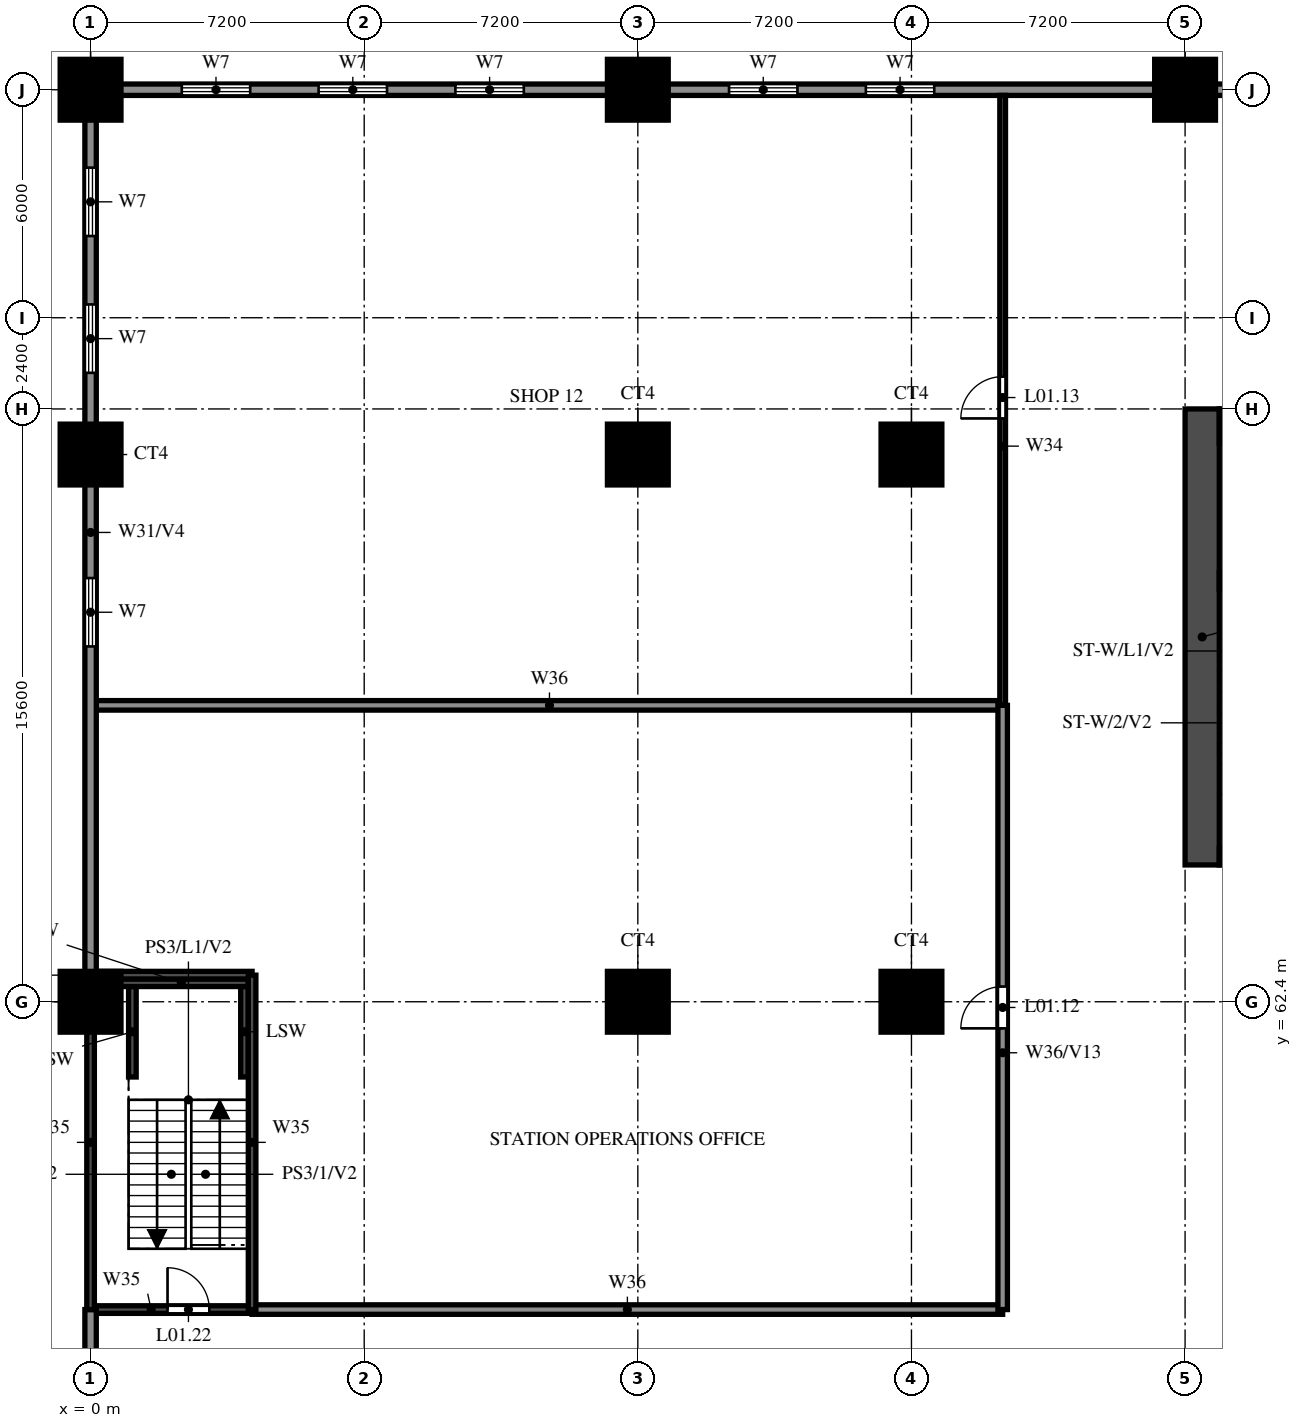
"""IFC4 building model, lengths in metres.
Left out: names, types, materials, properties, quantities, classifications, styles, units other than length and angle.
Written with IfcOpenShell. Run it as: python <this file> out.ifc"""

import sys

from ifc_helpers import new_model, si_unit, direction, frame, frame_2d, origin, origin_2d, place, context, subcontext, project, spatial, rectangle, circle, extrude, source, transform, mapped, element, fill, save


model = new_model("IFC4")
c1 = context("Model", 3, precision=1e-05, world=origin(), true_north=direction((0.0, 1.0)))
c2 = subcontext(c1, "Body", "Model", "MODEL_VIEW")
j1 = project(units=[si_unit("LENGTHUNIT", "METRE"), si_unit("PLANEANGLEUNIT", "RADIAN")], contexts=[c1])
p1 = place(None, origin())
s1 = spatial("IfcSite", under=j1, at=p1, CompositionType="ELEMENT")
p2 = place(p1, origin())
s2 = spatial("IfcBuilding", under=s1, at=p2, CompositionType="ELEMENT")
p3 = place(p2, frame((0.0, 0.0, 7.8)))
s3 = spatial("IfcBuildingStorey", under=s2, at=p3, CompositionType="ELEMENT", Elevation=7.8)
m1 = source(origin(), c2, "Body", "SweptSolid", [
    extrude(circle(Radius=0.8, at=origin_2d()), origin(), (0.0, 0.0, 1.0), 5.0),
])
for number, where, z_axis, x_axis in (
    (1, (0.0, 62.4, 0.0), (0.0, 0.0, 1.0), (1.0, 0.0, 0.0)),
    (2, (14.4, 62.4, 0.0), (0.0, 0.0, 1.0), (1.0, 0.0, 0.0)),
    (3, (21.6, 62.4, 0.0), (0.0, 0.0, 1.0), (1.0, 0.0, 0.0)),
    (4, (0.0, 76.8, 0.0), (0.0, 0.0, 1.0), (1.0, 0.0, 0.0)),
    (5, (14.4, 76.8, 0.0), (0.0, 0.0, 1.0), (1.0, 0.0, 0.0)),
    (6, (21.6, 76.8, 0.0), (0.0, 0.0, 1.0), (1.0, 0.0, 0.0)),
    (7, (0.0, 86.4, 0.0), (0.0, 0.0, 1.0), (1.0, 0.0, 0.0)),
    (8, (14.4, 86.4, 0.0), (0.0, 0.0, 1.0), (1.0, 0.0, 0.0)),
    (9, (28.8, 86.4, 0.0), (0.0, 0.0, 1.0), (1.0, 0.0, 0.0)),
):
    element("IfcColumn", number, at=place(p3, frame(where, z_axis=z_axis, x_axis=x_axis)), inside=s3, PredefinedType="COLUMN", context=c2, shape_type="MappedRepresentation", body=[
        mapped(m1, transform((0.0, 0.0, 0.0))),
    ])
p4 = place(p3, frame((29.25, 66.0, 0.0), z_axis=(0.0, 0.0, 1.0), x_axis=(0.0, 1.0, 0.0)))
e10 = element("IfcWall", 10, at=p4, inside=s3, PredefinedType="SHEAR", context=c2, shape_type="SweptSolid", body=[
    extrude(rectangle(XDim=12.0, YDim=0.9, at=frame_2d((6.0, 0.0))), origin(), (0.0, 0.0, 1.0), 5.0),
])
p5 = place(p3, frame((29.7, 77.55, 0.0), z_axis=(0.0, 0.0, 1.0), x_axis=(1.0, 0.0, 0.0)))
e11 = element("IfcWall", 11, at=p5, inside=s3, PredefinedType="SHEAR", context=c2, shape_type="SweptSolid", body=[
    extrude(rectangle(XDim=41.4, YDim=0.9, at=frame_2d((20.7, 0.0))), origin(), (0.0, 0.0, 1.0), 5.0),
])
p6 = place(p3, frame((29.7, 66.225, 0.0), z_axis=(0.0, 0.0, 1.0), x_axis=(1.0, 0.0, 0.0)))
e12 = element("IfcWall", 12, at=p6, inside=s3, PredefinedType="SHEAR", context=c2, shape_type="SweptSolid", body=[
    extrude(rectangle(XDim=41.4, YDim=0.45, at=frame_2d((20.7, 0.0))), origin(), (0.0, 0.0, 1.0), 5.0),
])
p7 = place(p6, frame((0.925, 0.0, 0.0)))
e13 = element("IfcOpeningElement", 13, at=p7, cuts=e12, PredefinedType="OPENING", context=c2, shape_type="SweptSolid", body=[
    extrude(rectangle(XDim=1.1, YDim=2.1, at=frame_2d((0.55, 1.05))), frame((0.0, 0.235, 0.0), z_axis=(0.0, -1.0, 0.0), x_axis=(1.0, 0.0, 0.0)), (0.0, 0.0, 1.0), 0.47),
])
p8 = place(p6, frame((3.738, 0.0, 0.0)))
e14 = element("IfcOpeningElement", 14, at=p8, cuts=e12, PredefinedType="OPENING", context=c2, shape_type="SweptSolid", body=[
    extrude(rectangle(XDim=1.8, YDim=2.1, at=frame_2d((0.9, 1.05))), frame((0.0, 0.235, 0.0), z_axis=(0.0, -1.0, 0.0), x_axis=(1.0, 0.0, 0.0)), (0.0, 0.0, 1.0), 0.47),
])
p9 = place(p3, frame((29.7, 73.475, 0.0), z_axis=(0.0, 0.0, 1.0), x_axis=(1.0, 0.0, 0.0)))
e15 = element("IfcWall", 15, at=p9, inside=s3, PredefinedType="SHEAR", context=c2, shape_type="SweptSolid", body=[
    extrude(rectangle(XDim=3.175, YDim=0.45, at=frame_2d((1.587, 0.0))), origin(), (0.0, 0.0, 1.0), 5.0),
])
for number, where, z_axis, x_axis in (
    (16, (1.1, 60.42, 0.0), (0.0, 0.0, 1.0), (0.0, 1.0, 0.0)),
    (17, (4.05, 60.42, 0.0), (0.0, 0.0, 1.0), (0.0, 1.0, 0.0)),
):
    element("IfcWall", number, at=place(p3, frame(where, z_axis=z_axis, x_axis=x_axis)), inside=s3, PredefinedType="SOLIDWALL", context=c2, shape_type="SweptSolid", body=[
        extrude(rectangle(XDim=2.38, YDim=0.2, at=frame_2d((1.19, 0.0))), origin(), (0.0, 0.0, 1.0), 2.5),
    ])
p10 = place(p3, frame((0.624, 62.9, 0.0), z_axis=(0.0, 0.0, 1.0), x_axis=(1.0, 0.0, 0.0)))
e18 = element("IfcWall", 18, at=p10, inside=s3, PredefinedType="SOLIDWALL", context=c2, shape_type="SweptSolid", body=[
    extrude(rectangle(XDim=3.526, YDim=0.2, at=frame_2d((1.763, 0.0))), origin(), (0.0, 0.0, 1.0), 2.5),
])
p11 = place(p3, frame((0.0, 54.3, 0.0), z_axis=(0.0, 0.0, 1.0), x_axis=(1.0, 0.0, 0.0)))
e19 = element("IfcWall", 19, at=p11, inside=s3, PredefinedType="SOLIDWALL", context=c2, shape_type="SweptSolid", body=[
    extrude(rectangle(XDim=4.25, YDim=0.2, at=frame_2d((2.125, 0.0))), origin(), (0.0, 0.0, 1.0), 5.0),
])
p12 = place(p11, frame((2.025, 0.0, 0.0)))
e20 = element("IfcOpeningElement", 20, at=p12, cuts=e19, PredefinedType="OPENING", context=c2, shape_type="SweptSolid", body=[
    extrude(rectangle(XDim=1.1, YDim=2.1, at=frame_2d((0.55, 1.05))), frame((0.0, 0.11, 0.0), z_axis=(0.0, -1.0, 0.0), x_axis=(1.0, 0.0, 0.0)), (0.0, 0.0, 1.0), 0.22),
])
p13 = place(p3, frame((4.25, 54.3, 0.0), z_axis=(0.0, 0.0, 1.0), x_axis=(1.0, 0.0, 0.0)))
e21 = element("IfcWall", 21, at=p13, inside=s3, PredefinedType="SOLIDWALL", context=c2, shape_type="SweptSolid", body=[
    extrude(rectangle(XDim=19.75, YDim=0.25, at=frame_2d((9.875, 0.0))), origin(), (0.0, 0.0, 1.0), 3.8),
])
p14 = place(p3, frame((0.0, 63.1, 0.0), z_axis=(0.0, 0.0, 1.0), x_axis=(1.0, 0.0, 0.0)))
e22 = element("IfcWall", 22, at=p14, inside=s3, PredefinedType="SOLIDWALL", context=c2, shape_type="SweptSolid", body=[
    extrude(rectangle(XDim=4.25, YDim=0.2, at=frame_2d((2.125, 0.0))), origin(), (0.0, 0.0, 1.0), 5.0),
])
p15 = place(p3, frame((0.15, 70.2, 0.0), z_axis=(0.0, 0.0, 1.0), x_axis=(1.0, 0.0, 0.0)))
e23 = element("IfcWall", 23, at=p15, inside=s3, PredefinedType="SOLIDWALL", context=c2, shape_type="SweptSolid", body=[
    extrude(rectangle(XDim=23.85, YDim=0.25, at=frame_2d((11.925, 0.0))), origin(), (0.0, 0.0, 1.0), 3.8),
])
p16 = place(p3, frame((0.0, 86.4, 0.0), z_axis=(0.0, 0.0, 1.0), x_axis=(1.0, 0.0, 0.0)))
e24 = element("IfcWall", 24, at=p16, inside=s3, PredefinedType="SOLIDWALL", context=c2, shape_type="SweptSolid", body=[
    extrude(rectangle(XDim=100.8, YDim=0.3, at=frame_2d((50.4, 0.0))), origin(), (0.0, 0.0, 1.0), 5.0),
])
p17 = place(p16, frame((2.4, 0.0, 0.6)))
e25 = element("IfcOpeningElement", 25, at=p17, cuts=e24, PredefinedType="OPENING", context=c2, shape_type="SweptSolid", body=[
    extrude(rectangle(XDim=1.8, YDim=2.4, at=frame_2d((0.9, 1.2))), frame((0.0, 0.16, 0.0), z_axis=(0.0, -1.0, 0.0), x_axis=(1.0, 0.0, 0.0)), (0.0, 0.0, 1.0), 0.32),
])
p18 = place(p16, frame((6.0, 0.0, 0.6)))
e26 = element("IfcOpeningElement", 26, at=p18, cuts=e24, PredefinedType="OPENING", context=c2, shape_type="SweptSolid", body=[
    extrude(rectangle(XDim=1.8, YDim=2.4, at=frame_2d((0.9, 1.2))), frame((0.0, 0.16, 0.0), z_axis=(0.0, -1.0, 0.0), x_axis=(1.0, 0.0, 0.0)), (0.0, 0.0, 1.0), 0.32),
])
p19 = place(p16, frame((9.6, 0.0, 0.6)))
e27 = element("IfcOpeningElement", 27, at=p19, cuts=e24, PredefinedType="OPENING", context=c2, shape_type="SweptSolid", body=[
    extrude(rectangle(XDim=1.8, YDim=2.4, at=frame_2d((0.9, 1.2))), frame((0.0, 0.16, 0.0), z_axis=(0.0, -1.0, 0.0), x_axis=(1.0, 0.0, 0.0)), (0.0, 0.0, 1.0), 0.32),
])
p20 = place(p16, frame((16.8, 0.0, 0.6)))
e28 = element("IfcOpeningElement", 28, at=p20, cuts=e24, PredefinedType="OPENING", context=c2, shape_type="SweptSolid", body=[
    extrude(rectangle(XDim=1.8, YDim=2.4, at=frame_2d((0.9, 1.2))), frame((0.0, 0.16, 0.0), z_axis=(0.0, -1.0, 0.0), x_axis=(1.0, 0.0, 0.0)), (0.0, 0.0, 1.0), 0.32),
])
p21 = place(p16, frame((20.4, 0.0, 0.6)))
e29 = element("IfcOpeningElement", 29, at=p21, cuts=e24, PredefinedType="OPENING", context=c2, shape_type="SweptSolid", body=[
    extrude(rectangle(XDim=1.8, YDim=2.4, at=frame_2d((0.9, 1.2))), frame((0.0, 0.16, 0.0), z_axis=(0.0, -1.0, 0.0), x_axis=(1.0, 0.0, 0.0)), (0.0, 0.0, 1.0), 0.32),
])
p22 = place(p16, frame((78.0, 0.0, 0.6)))
e30 = element("IfcOpeningElement", 30, at=p22, cuts=e24, PredefinedType="OPENING", context=c2, shape_type="SweptSolid", body=[
    extrude(rectangle(XDim=1.8, YDim=2.4, at=frame_2d((0.9, 1.2))), frame((0.0, 0.16, 0.0), z_axis=(0.0, -1.0, 0.0), x_axis=(1.0, 0.0, 0.0)), (0.0, 0.0, 1.0), 0.32),
])
p23 = place(p16, frame((81.6, 0.0, 0.6)))
e31 = element("IfcOpeningElement", 31, at=p23, cuts=e24, PredefinedType="OPENING", context=c2, shape_type="SweptSolid", body=[
    extrude(rectangle(XDim=1.8, YDim=2.4, at=frame_2d((0.9, 1.2))), frame((0.0, 0.16, 0.0), z_axis=(0.0, -1.0, 0.0), x_axis=(1.0, 0.0, 0.0)), (0.0, 0.0, 1.0), 0.32),
])
p24 = place(p16, frame((88.8, 0.0, 0.6)))
e32 = element("IfcOpeningElement", 32, at=p24, cuts=e24, PredefinedType="OPENING", context=c2, shape_type="SweptSolid", body=[
    extrude(rectangle(XDim=1.8, YDim=2.4, at=frame_2d((0.9, 1.2))), frame((0.0, 0.16, 0.0), z_axis=(0.0, -1.0, 0.0), x_axis=(1.0, 0.0, 0.0)), (0.0, 0.0, 1.0), 0.32),
])
p25 = place(p16, frame((92.4, 0.0, 0.6)))
e33 = element("IfcOpeningElement", 33, at=p25, cuts=e24, PredefinedType="OPENING", context=c2, shape_type="SweptSolid", body=[
    extrude(rectangle(XDim=1.8, YDim=2.4, at=frame_2d((0.9, 1.2))), frame((0.0, 0.16, 0.0), z_axis=(0.0, -1.0, 0.0), x_axis=(1.0, 0.0, 0.0)), (0.0, 0.0, 1.0), 0.32),
])
p26 = place(p16, frame((96.0, 0.0, 0.6)))
e34 = element("IfcOpeningElement", 34, at=p26, cuts=e24, PredefinedType="OPENING", context=c2, shape_type="SweptSolid", body=[
    extrude(rectangle(XDim=1.8, YDim=2.4, at=frame_2d((0.9, 1.2))), frame((0.0, 0.16, 0.0), z_axis=(0.0, -1.0, 0.0), x_axis=(1.0, 0.0, 0.0)), (0.0, 0.0, 1.0), 0.32),
])
p27 = place(p3, frame((0.0, 51.1, 0.0), z_axis=(0.0, 0.0, 1.0), x_axis=(0.0, 1.0, 0.0)))
e35 = element("IfcWall", 35, at=p27, inside=s3, PredefinedType="SOLIDWALL", context=c2, shape_type="SweptSolid", body=[
    extrude(rectangle(XDim=3.2, YDim=0.3, at=frame_2d((1.6, 0.0))), origin(), (0.0, 0.0, 1.0), 5.0),
])
p28 = place(p3, frame((0.0, 63.1, 0.0), z_axis=(0.0, 0.0, 1.0), x_axis=(0.0, 1.0, 0.0)))
e36 = element("IfcWall", 36, at=p28, inside=s3, PredefinedType="SOLIDWALL", context=c2, shape_type="SweptSolid", body=[
    extrude(rectangle(XDim=23.3, YDim=0.3, at=frame_2d((11.65, 0.0))), origin(), (0.0, 0.0, 1.0), 5.0),
])
p29 = place(p28, frame((8.65, 0.0, 0.6)))
e37 = element("IfcOpeningElement", 37, at=p29, cuts=e36, PredefinedType="OPENING", context=c2, shape_type="SweptSolid", body=[
    extrude(rectangle(XDim=1.8, YDim=2.4, at=frame_2d((0.9, 1.2))), frame((0.0, 0.16, 0.0), z_axis=(0.0, -1.0, 0.0), x_axis=(1.0, 0.0, 0.0)), (0.0, 0.0, 1.0), 0.32),
])
p30 = place(p28, frame((15.85, 0.0, 0.6)))
e38 = element("IfcOpeningElement", 38, at=p30, cuts=e36, PredefinedType="OPENING", context=c2, shape_type="SweptSolid", body=[
    extrude(rectangle(XDim=1.8, YDim=2.4, at=frame_2d((0.9, 1.2))), frame((0.0, 0.16, 0.0), z_axis=(0.0, -1.0, 0.0), x_axis=(1.0, 0.0, 0.0)), (0.0, 0.0, 1.0), 0.32),
])
p31 = place(p28, frame((19.45, 0.0, 0.6)))
e39 = element("IfcOpeningElement", 39, at=p31, cuts=e36, PredefinedType="OPENING", context=c2, shape_type="SweptSolid", body=[
    extrude(rectangle(XDim=1.8, YDim=2.4, at=frame_2d((0.9, 1.2))), frame((0.0, 0.16, 0.0), z_axis=(0.0, -1.0, 0.0), x_axis=(1.0, 0.0, 0.0)), (0.0, 0.0, 1.0), 0.32),
])
for number, where, z_axis, x_axis in (
    (40, (0.0, 54.3, 0.0), (0.0, 0.0, 1.0), (0.0, 1.0, 0.0)),
    (41, (4.25, 54.3, 0.0), (0.0, 0.0, 1.0), (0.0, 1.0, 0.0)),
):
    element("IfcWall", number, at=place(p3, frame(where, z_axis=z_axis, x_axis=x_axis)), inside=s3, PredefinedType="SOLIDWALL", context=c2, shape_type="SweptSolid", body=[
        extrude(rectangle(XDim=8.8, YDim=0.2, at=frame_2d((4.4, 0.0))), origin(), (0.0, 0.0, 1.0), 5.0),
    ])
p32 = place(p3, frame((24.0, 70.2, 0.0), z_axis=(0.0, 0.0, 1.0), x_axis=(0.0, 1.0, 0.0)))
e42 = element("IfcWall", 42, at=p32, inside=s3, PredefinedType="PARTITIONING", context=c2, shape_type="SweptSolid", body=[
    extrude(rectangle(XDim=16.05, YDim=0.15, at=frame_2d((8.025, 0.0))), origin(), (0.0, 0.0, 1.0), 3.8),
])
p33 = place(p32, frame((7.55, 0.0, 0.0)))
e43 = element("IfcOpeningElement", 43, at=p33, cuts=e42, PredefinedType="OPENING", context=c2, shape_type="SweptSolid", body=[
    extrude(rectangle(XDim=1.1, YDim=2.1, at=frame_2d((0.55, 1.05))), frame((0.0, 0.085, 0.0), z_axis=(0.0, -1.0, 0.0), x_axis=(1.0, 0.0, 0.0)), (0.0, 0.0, 1.0), 0.17),
])
p34 = place(p3, frame((24.0, 54.3, 0.0), z_axis=(0.0, 0.0, 1.0), x_axis=(0.0, 1.0, 0.0)))
e44 = element("IfcWall", 44, at=p34, inside=s3, PredefinedType="SOLIDWALL", context=c2, shape_type="SweptSolid", body=[
    extrude(rectangle(XDim=15.9, YDim=0.25, at=frame_2d((7.95, 0.0))), origin(), (0.0, 0.0, 1.0), 5.0),
])
p35 = place(p34, frame((7.4, 0.0, 0.0)))
e45 = element("IfcOpeningElement", 45, at=p35, cuts=e44, PredefinedType="OPENING", context=c2, shape_type="SweptSolid", body=[
    extrude(rectangle(XDim=1.1, YDim=2.1, at=frame_2d((0.55, 1.05))), frame((0.0, 0.135, 0.0), z_axis=(0.0, -1.0, 0.0), x_axis=(1.0, 0.0, 0.0)), (0.0, 0.0, 1.0), 0.27),
])
p36 = place(p35, origin())
e46 = element("IfcDoor", 46, at=p36, inside=s3, OperationType="SINGLE_SWING_RIGHT", PredefinedType="DOOR", context=c2, shape_type="SweptSolid", body=[
    extrude(rectangle(XDim=1.1, YDim=2.1, at=frame_2d((0.55, 1.05))), frame((0.0, 0.025, 0.0), z_axis=(0.0, -1.0, 0.0), x_axis=(1.0, 0.0, 0.0)), (0.0, 0.0, 1.0), 0.05),
])
fill(e45, e46)
p37 = place(p33, origin())
e47 = element("IfcDoor", 47, at=p37, inside=s3, OperationType="SINGLE_SWING_RIGHT", PredefinedType="DOOR", context=c2, shape_type="SweptSolid", body=[
    extrude(rectangle(XDim=1.1, YDim=2.1, at=frame_2d((0.55, 1.05))), frame((0.0, 0.025, 0.0), z_axis=(0.0, -1.0, 0.0), x_axis=(1.0, 0.0, 0.0)), (0.0, 0.0, 1.0), 0.05),
])
fill(e43, e47)
p38 = place(p12, origin())
e48 = element("IfcDoor", 48, at=p38, inside=s3, OperationType="SINGLE_SWING_RIGHT", PredefinedType="DOOR", context=c2, shape_type="SweptSolid", body=[
    extrude(rectangle(XDim=1.1, YDim=2.1, at=frame_2d((0.55, 1.05))), frame((0.0, 0.025, 0.0), z_axis=(0.0, -1.0, 0.0), x_axis=(1.0, 0.0, 0.0)), (0.0, 0.0, 1.0), 0.05),
])
fill(e20, e48)
p39 = place(p17, origin())
e49 = element("IfcWindow", 49, at=p39, inside=s3, PartitioningType="DOUBLE_PANEL_VERTICAL", PredefinedType="WINDOW", context=c2, shape_type="SweptSolid", body=[
    extrude(rectangle(XDim=1.8, YDim=2.4, at=frame_2d((0.9, 1.2))), frame((0.0, 0.03, 0.0), z_axis=(0.0, -1.0, 0.0), x_axis=(1.0, 0.0, 0.0)), (0.0, 0.0, 1.0), 0.06),
])
fill(e25, e49)
p40 = place(p18, origin())
e50 = element("IfcWindow", 50, at=p40, inside=s3, PartitioningType="DOUBLE_PANEL_VERTICAL", PredefinedType="WINDOW", context=c2, shape_type="SweptSolid", body=[
    extrude(rectangle(XDim=1.8, YDim=2.4, at=frame_2d((0.9, 1.2))), frame((0.0, 0.03, 0.0), z_axis=(0.0, -1.0, 0.0), x_axis=(1.0, 0.0, 0.0)), (0.0, 0.0, 1.0), 0.06),
])
fill(e26, e50)
p41 = place(p19, origin())
e51 = element("IfcWindow", 51, at=p41, inside=s3, PartitioningType="DOUBLE_PANEL_VERTICAL", PredefinedType="WINDOW", context=c2, shape_type="SweptSolid", body=[
    extrude(rectangle(XDim=1.8, YDim=2.4, at=frame_2d((0.9, 1.2))), frame((0.0, 0.03, 0.0), z_axis=(0.0, -1.0, 0.0), x_axis=(1.0, 0.0, 0.0)), (0.0, 0.0, 1.0), 0.06),
])
fill(e27, e51)
p42 = place(p20, origin())
e52 = element("IfcWindow", 52, at=p42, inside=s3, PartitioningType="DOUBLE_PANEL_VERTICAL", PredefinedType="WINDOW", context=c2, shape_type="SweptSolid", body=[
    extrude(rectangle(XDim=1.8, YDim=2.4, at=frame_2d((0.9, 1.2))), frame((0.0, 0.03, 0.0), z_axis=(0.0, -1.0, 0.0), x_axis=(1.0, 0.0, 0.0)), (0.0, 0.0, 1.0), 0.06),
])
fill(e28, e52)
p43 = place(p21, origin())
e53 = element("IfcWindow", 53, at=p43, inside=s3, PartitioningType="DOUBLE_PANEL_VERTICAL", PredefinedType="WINDOW", context=c2, shape_type="SweptSolid", body=[
    extrude(rectangle(XDim=1.8, YDim=2.4, at=frame_2d((0.9, 1.2))), frame((0.0, 0.03, 0.0), z_axis=(0.0, -1.0, 0.0), x_axis=(1.0, 0.0, 0.0)), (0.0, 0.0, 1.0), 0.06),
])
fill(e29, e53)
p44 = place(p29, origin())
e54 = element("IfcWindow", 54, at=p44, inside=s3, PartitioningType="DOUBLE_PANEL_VERTICAL", PredefinedType="WINDOW", context=c2, shape_type="SweptSolid", body=[
    extrude(rectangle(XDim=1.8, YDim=2.4, at=frame_2d((0.9, 1.2))), frame((0.0, 0.03, 0.0), z_axis=(0.0, -1.0, 0.0), x_axis=(1.0, 0.0, 0.0)), (0.0, 0.0, 1.0), 0.06),
])
fill(e37, e54)
p45 = place(p30, origin())
e55 = element("IfcWindow", 55, at=p45, inside=s3, PartitioningType="DOUBLE_PANEL_VERTICAL", PredefinedType="WINDOW", context=c2, shape_type="SweptSolid", body=[
    extrude(rectangle(XDim=1.8, YDim=2.4, at=frame_2d((0.9, 1.2))), frame((0.0, 0.03, 0.0), z_axis=(0.0, -1.0, 0.0), x_axis=(1.0, 0.0, 0.0)), (0.0, 0.0, 1.0), 0.06),
])
fill(e38, e55)
p46 = place(p31, origin())
e56 = element("IfcWindow", 56, at=p46, inside=s3, PartitioningType="DOUBLE_PANEL_VERTICAL", PredefinedType="WINDOW", context=c2, shape_type="SweptSolid", body=[
    extrude(rectangle(XDim=1.8, YDim=2.4, at=frame_2d((0.9, 1.2))), frame((0.0, 0.03, 0.0), z_axis=(0.0, -1.0, 0.0), x_axis=(1.0, 0.0, 0.0)), (0.0, 0.0, 1.0), 0.06),
])
fill(e39, e56)
save(model, sys.argv[1])
